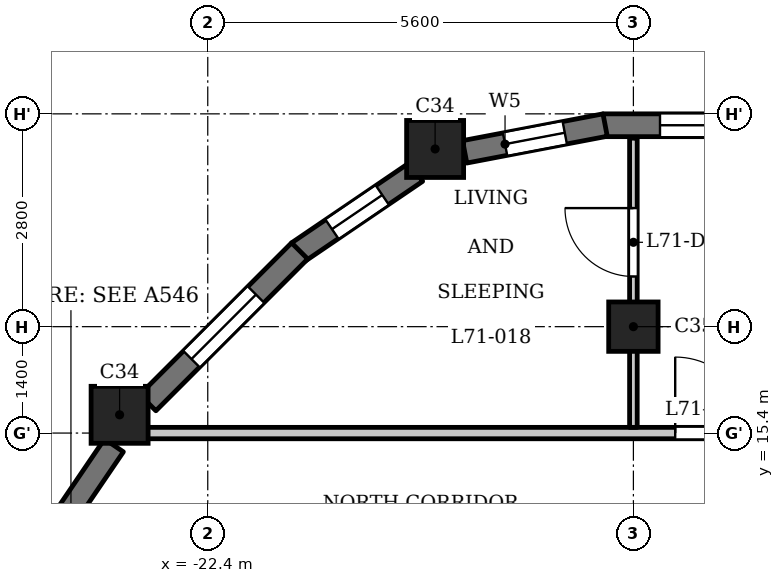
"""IFC4 building model, lengths in metres.
Left out: names, types, materials, properties, quantities, classifications, styles, units other than length and angle.
Written with IfcOpenShell. Run it as: python <this file> out.ifc"""

import sys

from ifc_helpers import new_model, si_unit, direction, frame, frame_2d, origin, origin_2d, place, context, subcontext, project, spatial, rectangle, extrude, element, fill, save


model = new_model("IFC4")
c1 = context("Model", 3, precision=1e-05, world=origin(), true_north=direction((0.0, 1.0)))
c2 = subcontext(c1, "Body", "Model", "MODEL_VIEW")
j1 = project(units=[si_unit("LENGTHUNIT", "METRE"), si_unit("PLANEANGLEUNIT", "RADIAN")], contexts=[c1])
p1 = place(None, origin())
s1 = spatial("IfcSite", under=j1, at=p1, CompositionType="ELEMENT")
p2 = place(p1, origin())
s2 = spatial("IfcBuilding", under=s1, at=p2, CompositionType="ELEMENT")
p3 = place(p2, frame((0.0, 0.0, 273.2)))
s3 = spatial("IfcBuildingStorey", under=s2, at=p3, CompositionType="ELEMENT", Elevation=273.2)
for number, where, z_axis, x_axis in (
    (1, (-19.409, 19.138, 0.0), (0.0, 0.0, 1.0), (1.0, 0.0, 0.0)),
    (2, (-23.56, 15.64, 0.0), (0.0, 0.0, 1.0), (1.0, 0.0, 0.0)),
):
    element("IfcColumn", number, at=place(p3, frame(where, z_axis=z_axis, x_axis=x_axis)), inside=s3, PredefinedType="COLUMN", context=c2, shape_type="SweptSolid", body=[
        extrude(rectangle(XDim=0.75, YDim=0.75, at=origin_2d()), origin(), (0.0, 0.0, 1.0), 3.5),
    ])
p4 = place(p3, frame((-16.8, 16.8, 0.0), z_axis=(0.0, 0.0, 1.0), x_axis=(1.0, 0.0, 0.0)))
e3 = element("IfcColumn", 3, at=p4, inside=s3, PredefinedType="COLUMN", context=c2, shape_type="SweptSolid", body=[
    extrude(rectangle(XDim=0.65, YDim=0.65, at=origin_2d()), origin(), (0.0, 0.0, 1.0), 3.5),
])
p5 = place(p3, frame((-14.375, 19.45, 0.0), z_axis=(0.0, 0.0, 1.0), x_axis=(-1.0, 0.0, 0.0)))
e4 = element("IfcWall", 4, at=p5, inside=s3, PredefinedType="SOLIDWALL", context=c2, shape_type="SweptSolid", body=[
    extrude(rectangle(XDim=2.825, YDim=0.3, at=frame_2d((1.413, 0.0))), origin(), (0.0, 0.0, 1.0), 2.55),
])
p6 = place(p5, frame((0.275, 0.0, 0.9)))
e5 = element("IfcOpeningElement", 5, at=p6, cuts=e4, PredefinedType="OPENING", context=c2, shape_type="SweptSolid", body=[
    extrude(rectangle(XDim=1.8, YDim=1.25, at=frame_2d((0.9, 0.625))), frame((0.0, 0.16, 0.0), z_axis=(0.0, -1.0, 0.0), x_axis=(1.0, 0.0, 0.0)), (0.0, 0.0, 1.0), 0.32),
])
p7 = place(p3, frame((-17.172, 19.453, 0.0), z_axis=(0.0, 0.0, 1.0), x_axis=(-0.982284001233, -0.187398348234, 0.0)))
e6 = element("IfcWall", 6, at=p7, inside=s3, PredefinedType="SOLIDWALL", context=c2, shape_type="SweptSolid", body=[
    extrude(rectangle(XDim=1.881, YDim=0.3, at=frame_2d((0.941, 0.0))), origin(), (0.0, 0.0, 1.0), 2.55),
])
p8 = place(p7, frame((0.541, 0.0, 0.6)))
e7 = element("IfcOpeningElement", 7, at=p8, cuts=e6, PredefinedType="OPENING", context=c2, shape_type="SweptSolid", body=[
    extrude(rectangle(XDim=0.8, YDim=1.55, at=frame_2d((0.4, 0.775))), frame((0.0, 0.16, 0.0), z_axis=(0.0, -1.0, 0.0), x_axis=(1.0, 0.0, 0.0)), (0.0, 0.0, 1.0), 0.32),
])
p9 = place(p3, frame((-19.657, 18.836, 0.0), z_axis=(0.0, 0.0, 1.0), x_axis=(-0.82704477487, -0.562136051469, 0.0)))
e8 = element("IfcWall", 8, at=p9, inside=s3, PredefinedType="SOLIDWALL", context=c2, shape_type="SweptSolid", body=[
    extrude(rectangle(XDim=1.881, YDim=0.3, at=frame_2d((0.94, 0.0))), origin(), (0.0, 0.0, 1.0), 2.55),
])
p10 = place(p9, frame((0.541, 0.0, 0.6)))
e9 = element("IfcOpeningElement", 9, at=p10, cuts=e8, PredefinedType="OPENING", context=c2, shape_type="SweptSolid", body=[
    extrude(rectangle(XDim=0.8, YDim=1.55, at=frame_2d((0.4, 0.775))), frame((0.0, 0.16, 0.0), z_axis=(0.0, -1.0, 0.0), x_axis=(1.0, 0.0, 0.0)), (0.0, 0.0, 1.0), 0.32),
])
p11 = place(p3, frame((-21.191, 17.797, 0.0), z_axis=(0.0, 0.0, 1.0), x_axis=(-0.707106781187, -0.707106781187, 0.0)))
e10 = element("IfcWall", 10, at=p11, inside=s3, PredefinedType="SOLIDWALL", context=c2, shape_type="SweptSolid", body=[
    extrude(rectangle(XDim=2.825, YDim=0.3, at=frame_2d((1.413, 0.0))), origin(), (0.0, 0.0, 1.0), 2.55),
])
p12 = place(p11, frame((0.812, 0.0, 0.6)))
e11 = element("IfcOpeningElement", 11, at=p12, cuts=e10, PredefinedType="OPENING", context=c2, shape_type="SweptSolid", body=[
    extrude(rectangle(XDim=1.2, YDim=1.55, at=frame_2d((0.6, 0.775))), frame((0.0, 0.16, 0.0), z_axis=(0.0, -1.0, 0.0), x_axis=(1.0, 0.0, 0.0)), (0.0, 0.0, 1.0), 0.32),
])
p13 = place(p3, frame((-23.634, 15.237, 0.0), z_axis=(0.0, 0.0, 1.0), x_axis=(-0.562099454787, -0.827069648173, 0.0)))
e12 = element("IfcWall", 12, at=p13, inside=s3, PredefinedType="SOLIDWALL", context=c2, shape_type="SweptSolid", body=[
    extrude(rectangle(XDim=1.427, YDim=0.3, at=frame_2d((0.714, 0.0))), origin(), (0.0, 0.0, 1.0), 2.55),
])
p14 = place(p3, frame((-23.55, 15.4, 0.0), z_axis=(0.0, 0.0, 1.0), x_axis=(1.0, 0.0, 0.0)))
e13 = element("IfcWall", 13, at=p14, inside=s3, PredefinedType="PARTITIONING", context=c2, shape_type="SweptSolid", body=[
    extrude(rectangle(XDim=46.872, YDim=0.15, at=frame_2d((23.436, 0.0))), origin(), (0.0, 0.0, 1.0), 3.2),
])
p15 = place(p14, frame((7.3, 0.0, 0.0)))
e14 = element("IfcOpeningElement", 14, at=p15, cuts=e13, PredefinedType="OPENING", context=c2, shape_type="SweptSolid", body=[
    extrude(rectangle(XDim=1.0, YDim=2.1, at=frame_2d((0.5, 1.05))), frame((0.0, 0.085, 0.0), z_axis=(0.0, -1.0, 0.0), x_axis=(1.0, 0.0, 0.0)), (0.0, 0.0, 1.0), 0.17),
])
p16 = place(p14, frame((16.3, 0.0, 0.0)))
e15 = element("IfcOpeningElement", 15, at=p16, cuts=e13, PredefinedType="OPENING", context=c2, shape_type="SweptSolid", body=[
    extrude(rectangle(XDim=1.0, YDim=2.1, at=frame_2d((0.5, 1.05))), frame((0.0, 0.085, 0.0), z_axis=(0.0, -1.0, 0.0), x_axis=(1.0, 0.0, 0.0)), (0.0, 0.0, 1.0), 0.17),
])
p17 = place(p14, frame((29.7, 0.0, 0.0)))
e16 = element("IfcOpeningElement", 16, at=p17, cuts=e13, PredefinedType="OPENING", context=c2, shape_type="SweptSolid", body=[
    extrude(rectangle(XDim=1.0, YDim=2.1, at=frame_2d((0.5, 1.05))), frame((0.0, 0.085, 0.0), z_axis=(0.0, -1.0, 0.0), x_axis=(1.0, 0.0, 0.0)), (0.0, 0.0, 1.0), 0.17),
])
p18 = place(p14, frame((38.7, 0.0, 0.0)))
e17 = element("IfcOpeningElement", 17, at=p18, cuts=e13, PredefinedType="OPENING", context=c2, shape_type="SweptSolid", body=[
    extrude(rectangle(XDim=1.0, YDim=2.1, at=frame_2d((0.5, 1.05))), frame((0.0, 0.085, 0.0), z_axis=(0.0, -1.0, 0.0), x_axis=(1.0, 0.0, 0.0)), (0.0, 0.0, 1.0), 0.17),
])
p19 = place(p3, frame((-16.8, 15.475, 0.0), z_axis=(0.0, 0.0, 1.0), x_axis=(0.0, 1.0, 0.0)))
e18 = element("IfcWall", 18, at=p19, inside=s3, PredefinedType="PARTITIONING", context=c2, shape_type="SweptSolid", body=[
    extrude(rectangle(XDim=3.805, YDim=0.1, at=frame_2d((1.902, 0.0))), origin(), (0.0, 0.0, 1.0), 3.2),
])
p20 = place(p19, frame((1.985, 0.0, 0.0)))
e19 = element("IfcOpeningElement", 19, at=p20, cuts=e18, PredefinedType="OPENING", context=c2, shape_type="SweptSolid", body=[
    extrude(rectangle(XDim=0.9, YDim=2.1, at=frame_2d((0.45, 1.05))), frame((0.0, 0.06, 0.0), z_axis=(0.0, -1.0, 0.0), x_axis=(1.0, 0.0, 0.0)), (0.0, 0.0, 1.0), 0.12),
])
p21 = place(p15, origin())
e20 = element("IfcDoor", 20, at=p21, inside=s3, OperationType="SINGLE_SWING_RIGHT", PredefinedType="DOOR", context=c2, shape_type="SweptSolid", body=[
    extrude(rectangle(XDim=1.0, YDim=2.1, at=frame_2d((0.5, 1.05))), frame((0.0, 0.025, 0.0), z_axis=(0.0, -1.0, 0.0), x_axis=(1.0, 0.0, 0.0)), (0.0, 0.0, 1.0), 0.05),
])
fill(e14, e20)
p22 = place(p20, origin())
e21 = element("IfcDoor", 21, at=p22, inside=s3, OperationType="SINGLE_SWING_LEFT", PredefinedType="DOOR", context=c2, shape_type="SweptSolid", body=[
    extrude(rectangle(XDim=0.9, YDim=2.1, at=frame_2d((0.45, 1.05))), frame((0.0, 0.025, 0.0), z_axis=(0.0, -1.0, 0.0), x_axis=(1.0, 0.0, 0.0)), (0.0, 0.0, 1.0), 0.05),
])
fill(e19, e21)
p23 = place(p6, origin())
e22 = element("IfcWindow", 22, at=p23, inside=s3, PartitioningType="SINGLE_PANEL", PredefinedType="WINDOW", context=c2, shape_type="SweptSolid", body=[
    extrude(rectangle(XDim=1.8, YDim=1.25, at=frame_2d((0.9, 0.625))), frame((0.0, 0.03, 0.0), z_axis=(0.0, -1.0, 0.0), x_axis=(1.0, 0.0, 0.0)), (0.0, 0.0, 1.0), 0.06),
])
fill(e5, e22)
p24 = place(p8, origin())
e23 = element("IfcWindow", 23, at=p24, inside=s3, PartitioningType="SINGLE_PANEL", PredefinedType="WINDOW", context=c2, shape_type="SweptSolid", body=[
    extrude(rectangle(XDim=0.8, YDim=1.55, at=frame_2d((0.4, 0.775))), frame((0.0, 0.03, 0.0), z_axis=(0.0, -1.0, 0.0), x_axis=(1.0, 0.0, 0.0)), (0.0, 0.0, 1.0), 0.06),
])
fill(e7, e23)
p25 = place(p10, origin())
e24 = element("IfcWindow", 24, at=p25, inside=s3, PartitioningType="SINGLE_PANEL", PredefinedType="WINDOW", context=c2, shape_type="SweptSolid", body=[
    extrude(rectangle(XDim=0.8, YDim=1.55, at=frame_2d((0.4, 0.775))), frame((0.0, 0.03, 0.0), z_axis=(0.0, -1.0, 0.0), x_axis=(1.0, 0.0, 0.0)), (0.0, 0.0, 1.0), 0.06),
])
fill(e9, e24)
p26 = place(p12, origin())
e25 = element("IfcWindow", 25, at=p26, inside=s3, PartitioningType="SINGLE_PANEL", PredefinedType="WINDOW", context=c2, shape_type="SweptSolid", body=[
    extrude(rectangle(XDim=1.2, YDim=1.55, at=frame_2d((0.6, 0.775))), frame((0.0, 0.03, 0.0), z_axis=(0.0, -1.0, 0.0), x_axis=(1.0, 0.0, 0.0)), (0.0, 0.0, 1.0), 0.06),
])
fill(e11, e25)
save(model, sys.argv[1])
